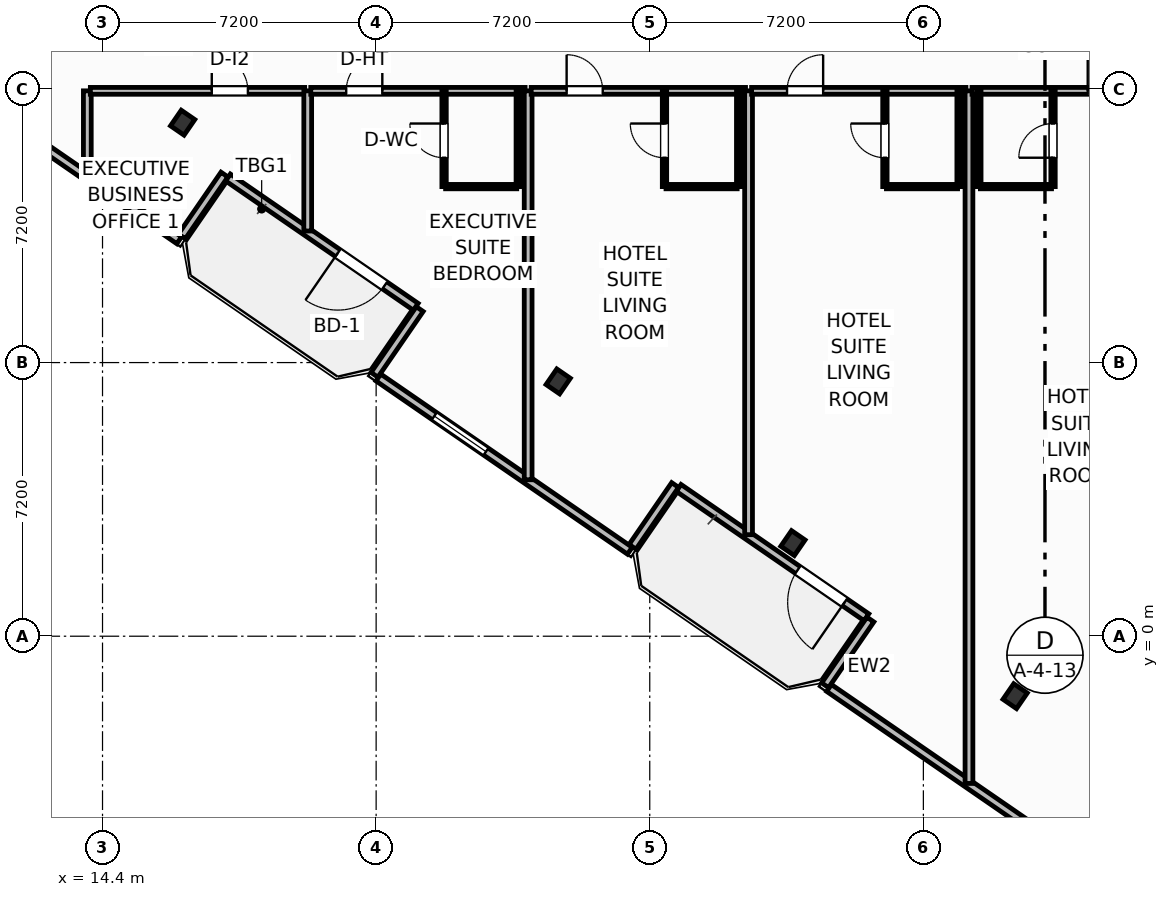
"""IFC4 building model, lengths in metres.
Left out: names, types, materials, properties, quantities, classifications, styles, units other than length and angle.
Written with IfcOpenShell. Run it as: python <this file> out.ifc"""

import sys

from ifc_helpers import new_model, si_unit, direction, frame, frame_2d, origin, origin_2d, place, context, subcontext, project, spatial, rectangle, i_section, extrude, element, fill, save


model = new_model("IFC4")
c1 = context("Model", 3, precision=1e-05, world=origin(), true_north=direction((0.0, 1.0)))
c2 = subcontext(c1, "Body", "Model", "MODEL_VIEW")
j1 = project(units=[si_unit("LENGTHUNIT", "METRE"), si_unit("PLANEANGLEUNIT", "RADIAN")], contexts=[c1])
p1 = place(None, origin())
s1 = spatial("IfcSite", under=j1, at=p1, CompositionType="ELEMENT")
p2 = place(p1, origin())
s2 = spatial("IfcBuilding", under=s1, at=p2, CompositionType="ELEMENT")
p3 = place(p2, frame((0.0, 0.0, 60.3)))
s3 = spatial("IfcBuildingStorey", under=s2, at=p3, CompositionType="ELEMENT", Elevation=60.3)
for number, where, z_axis, x_axis in (
    (1, (16.509, 13.512, 0.0), (0.0, 0.0, 1.0), (0.824, -0.567, 0.0)),
    (2, (26.391, 6.705, 0.0), (0.0, 0.0, 1.0), (0.824, -0.567, 0.0)),
    (3, (32.568, 2.45, 0.0), (0.0, 0.0, 1.0), (0.824, -0.567, 0.0)),
    (4, (38.415, -1.577, 0.0), (0.0, 0.0, 1.0), (0.824, -0.567, 0.0)),
):
    element("IfcColumn", number, at=place(p3, frame(where, z_axis=z_axis, x_axis=x_axis)), inside=s3, PredefinedType="COLUMN", context=c2, shape_type="SweptSolid", body=[
        extrude(i_section(OverallWidth=0.432, OverallDepth=0.498, WebThickness=0.056, FlangeThickness=0.089, FilletRadius=0.025, at=origin_2d()), origin(), (0.0, 0.0, 1.0), 3.7),
    ])
p4 = place(p3, frame((22.643, 8.667, 0.0), z_axis=(0.0, 0.0, 1.0), x_axis=(-0.823534636215, 0.567265989598, 0.0)))
e5 = element("IfcWall", 5, at=p4, inside=s3, PredefinedType="SOLIDWALL", context=c2, shape_type="SweptSolid", body=[
    extrude(rectangle(XDim=6.0, YDim=0.22, at=frame_2d((3.0, 0.0))), origin(), (0.0, 0.0, 1.0), 2.73),
])
p5 = place(p4, frame((0.992, 0.0, 0.0)))
e6 = element("IfcOpeningElement", 6, at=p5, cuts=e5, PredefinedType="OPENING", context=c2, shape_type="SweptSolid", body=[
    extrude(rectangle(XDim=1.5, YDim=2.25, at=frame_2d((0.75, 1.125))), frame((0.0, 0.12, 0.0), z_axis=(0.0, -1.0, 0.0), x_axis=(1.0, 0.0, 0.0)), (0.0, 0.0, 1.0), 0.24),
])
p6 = place(p3, frame((34.502, 0.499, 0.0), z_axis=(0.0, 0.0, 1.0), x_axis=(-0.823534636215, 0.567265989598, 0.0)))
e7 = element("IfcWall", 7, at=p6, inside=s3, PredefinedType="SOLIDWALL", context=c2, shape_type="SweptSolid", body=[
    extrude(rectangle(XDim=6.0, YDim=0.22, at=frame_2d((3.0, 0.0))), origin(), (0.0, 0.0, 1.0), 2.73),
])
p7 = place(p6, frame((0.696, 0.0, 0.0)))
e8 = element("IfcOpeningElement", 8, at=p7, cuts=e7, PredefinedType="OPENING", context=c2, shape_type="SweptSolid", body=[
    extrude(rectangle(XDim=1.5, YDim=2.25, at=frame_2d((0.75, 1.125))), frame((0.0, 0.12, 0.0), z_axis=(0.0, -1.0, 0.0), x_axis=(1.0, 0.0, 0.0)), (0.0, 0.0, 1.0), 0.24),
])
p8 = place(p3, frame((-2.728, 23.605, 0.0), z_axis=(0.0, 0.0, 1.0), x_axis=(0.823535075462, -0.567265351915, 0.0)))
e9 = element("IfcWall", 9, at=p8, inside=s3, PredefinedType="SOLIDWALL", context=c2, shape_type="SweptSolid", body=[
    extrude(rectangle(XDim=23.247, YDim=0.22, at=frame_2d((11.624, 0.0))), origin(), (0.0, 0.0, 1.0), 2.73),
])
p9 = place(p8, frame((15.55, 0.0, 0.8)))
e10 = element("IfcOpeningElement", 10, at=p9, cuts=e9, PredefinedType="OPENING", context=c2, shape_type="SweptSolid", body=[
    extrude(rectangle(XDim=1.65, YDim=1.65, at=frame_2d((0.825, 0.825))), frame((0.0, 0.12, 0.0), z_axis=(0.0, -1.0, 0.0), x_axis=(1.0, 0.0, 0.0)), (0.0, 0.0, 1.0), 0.24),
])
p10 = place(p3, frame((16.488, 10.521, 0.0), z_axis=(0.0, 0.0, 1.0), x_axis=(0.567131976434, 0.823626930902, 0.0)))
e11 = element("IfcWall", 11, at=p10, inside=s3, PredefinedType="SOLIDWALL", context=c2, shape_type="SweptSolid", body=[
    extrude(rectangle(XDim=1.975, YDim=0.22, at=frame_2d((0.988, 0.0))), origin(), (0.0, 0.0, 1.0), 2.73),
])
p11 = place(p3, frame((22.747, 8.607, 0.0), z_axis=(0.0, 0.0, 1.0), x_axis=(-0.567219383419, -0.823566737474, 0.0)))
e12 = element("IfcWall", 12, at=p11, inside=s3, PredefinedType="SOLIDWALL", context=c2, shape_type="SweptSolid", body=[
    extrude(rectangle(XDim=2.1, YDim=0.22, at=frame_2d((1.05, 0.0))), origin(), (0.0, 0.0, 1.0), 2.73),
])
p12 = place(p3, frame((21.659, 6.807, 0.0), z_axis=(0.0, 0.0, 1.0), x_axis=(0.823535360023, -0.567264938799, 0.0)))
e13 = element("IfcWall", 13, at=p12, inside=s3, PredefinedType="SOLIDWALL", context=c2, shape_type="SweptSolid", body=[
    extrude(rectangle(XDim=8.035, YDim=0.22, at=frame_2d((4.018, 0.0))), origin(), (0.0, 0.0, 1.0), 2.73),
])
p13 = place(p12, frame((1.788, 0.0, 0.8)))
e14 = element("IfcOpeningElement", 14, at=p13, cuts=e13, PredefinedType="OPENING", context=c2, shape_type="SweptSolid", body=[
    extrude(rectangle(XDim=1.65, YDim=1.65, at=frame_2d((0.825, 0.825))), frame((0.0, 0.12, 0.0), z_axis=(0.0, -1.0, 0.0), x_axis=(1.0, 0.0, 0.0)), (0.0, 0.0, 1.0), 0.24),
])
p14 = place(p3, frame((28.347, 2.352, 0.0), z_axis=(0.0, 0.0, 1.0), x_axis=(0.567215821234, 0.823569190865, 0.0)))
e15 = element("IfcWall", 15, at=p14, inside=s3, PredefinedType="SOLIDWALL", context=c2, shape_type="SweptSolid", body=[
    extrude(rectangle(XDim=1.975, YDim=0.22, at=frame_2d((0.988, 0.0))), origin(), (0.0, 0.0, 1.0), 2.73),
])
p15 = place(p3, frame((34.606, 0.439, 0.0), z_axis=(0.0, 0.0, 1.0), x_axis=(-0.567219383419, -0.823566737474, 0.0)))
e16 = element("IfcWall", 16, at=p15, inside=s3, PredefinedType="SOLIDWALL", context=c2, shape_type="SweptSolid", body=[
    extrude(rectangle(XDim=2.1, YDim=0.22, at=frame_2d((1.05, 0.0))), origin(), (0.0, 0.0, 1.0), 2.73),
])
p16 = place(p3, frame((33.518, -1.362, 0.0), z_axis=(0.0, 0.0, 1.0), x_axis=(0.82353935489, -0.567259139148, 0.0)))
e17 = element("IfcWall", 17, at=p16, inside=s3, PredefinedType="SOLIDWALL", context=c2, shape_type="SweptSolid", body=[
    extrude(rectangle(XDim=23.147, YDim=0.22, at=frame_2d((11.573, 0.0))), origin(), (0.0, 0.0, 1.0), 2.73),
])
p17 = place(p16, frame((10.749, 0.0, 0.8)))
e18 = element("IfcOpeningElement", 18, at=p17, cuts=e17, PredefinedType="OPENING", context=c2, shape_type="SweptSolid", body=[
    extrude(rectangle(XDim=1.65, YDim=1.65, at=frame_2d((0.825, 0.825))), frame((0.0, 0.12, 0.0), z_axis=(0.0, -1.0, 0.0), x_axis=(1.0, 0.0, 0.0)), (0.0, 0.0, 1.0), 0.24),
])
p18 = place(p3, frame((14.0, 12.107, 0.0), z_axis=(0.0, 0.0, 1.0), x_axis=(0.0, 1.0, 0.0)))
e19 = element("IfcWall", 19, at=p18, inside=s3, PredefinedType="PARTITIONING", context=c2, shape_type="SweptSolid", body=[
    extrude(rectangle(XDim=2.243, YDim=0.205, at=frame_2d((1.122, 0.0))), origin(), (0.0, 0.0, 1.0), 3.45),
])
p19 = place(p3, frame((14.08, 14.35, 0.0), z_axis=(0.0, 0.0, 1.0), x_axis=(1.0, 0.0, 0.0)))
e20 = element("IfcWall", 20, at=p19, inside=s3, PredefinedType="PARTITIONING", context=c2, shape_type="SweptSolid", body=[
    extrude(rectangle(XDim=5.64, YDim=0.18, at=frame_2d((2.82, 0.0))), origin(), (0.0, 0.0, 1.0), 3.45),
])
p20 = place(p19, frame((3.195, 0.0, 0.0)))
e21 = element("IfcOpeningElement", 21, at=p20, cuts=e20, PredefinedType="OPENING", context=c2, shape_type="SweptSolid", body=[
    extrude(rectangle(XDim=0.95, YDim=2.05, at=frame_2d((0.475, 1.025))), frame((0.0, 0.1, 0.0), z_axis=(0.0, -1.0, 0.0), x_axis=(1.0, 0.0, 0.0)), (0.0, 0.0, 1.0), 0.2),
])
p21 = place(p3, frame((19.8, 10.662, 0.0), z_axis=(0.0, 0.0, 1.0), x_axis=(0.0, 1.0, 0.0)))
e22 = element("IfcWall", 22, at=p21, inside=s3, PredefinedType="PARTITIONING", context=c2, shape_type="SweptSolid", body=[
    extrude(rectangle(XDim=3.688, YDim=0.205, at=frame_2d((1.844, 0.0))), origin(), (0.0, 0.0, 1.0), 3.45),
])
p22 = place(p3, frame((19.88, 14.35, 0.0), z_axis=(0.0, 0.0, 1.0), x_axis=(1.0, 0.0, 0.0)))
e23 = element("IfcWall", 23, at=p22, inside=s3, PredefinedType="PARTITIONING", context=c2, shape_type="SweptSolid", body=[
    extrude(rectangle(XDim=5.64, YDim=0.18, at=frame_2d((2.82, 0.0))), origin(), (0.0, 0.0, 1.0), 3.45),
])
p23 = place(p22, frame((0.933, 0.0, 0.0)))
e24 = element("IfcOpeningElement", 24, at=p23, cuts=e23, PredefinedType="OPENING", context=c2, shape_type="SweptSolid", body=[
    extrude(rectangle(XDim=0.95, YDim=2.15, at=frame_2d((0.475, 1.075))), frame((0.0, 0.1, 0.0), z_axis=(0.0, -1.0, 0.0), x_axis=(1.0, 0.0, 0.0)), (0.0, 0.0, 1.0), 0.2),
])
p24 = place(p3, frame((23.428, 11.83, 0.0), z_axis=(0.0, 0.0, 1.0), x_axis=(1.0, 0.0, 0.0)))
e25 = element("IfcWall", 25, at=p24, inside=s3, PredefinedType="PARTITIONING", context=c2, shape_type="SweptSolid", body=[
    extrude(rectangle(XDim=1.872, YDim=0.115, at=frame_2d((0.936, 0.0))), origin(), (0.0, 0.0, 1.0), 3.45),
])
p25 = place(p3, frame((23.388, 11.83, 0.0), z_axis=(0.0, 0.0, 1.0), x_axis=(0.0, 1.0, 0.0)))
e26 = element("IfcWall", 26, at=p25, inside=s3, PredefinedType="PARTITIONING", context=c2, shape_type="SweptSolid", body=[
    extrude(rectangle(XDim=2.52, YDim=0.115, at=frame_2d((1.26, 0.0))), origin(), (0.0, 0.0, 1.0), 3.45),
])
p26 = place(p25, frame((0.76, 0.0, 0.0)))
e27 = element("IfcOpeningElement", 27, at=p26, cuts=e26, PredefinedType="OPENING", context=c2, shape_type="SweptSolid", body=[
    extrude(rectangle(XDim=0.9, YDim=2.05, at=frame_2d((0.45, 1.025))), frame((0.0, 0.067, 0.0), z_axis=(0.0, -1.0, 0.0), x_axis=(1.0, 0.0, 0.0)), (0.0, 0.0, 1.0), 0.135),
])
p27 = place(p3, frame((25.34, 11.83, 0.0), z_axis=(0.0, 0.0, 1.0), x_axis=(0.0, 1.0, 0.0)))
e28 = element("IfcWall", 28, at=p27, inside=s3, PredefinedType="PARTITIONING", context=c2, shape_type="SweptSolid", body=[
    extrude(rectangle(XDim=2.52, YDim=0.115, at=frame_2d((1.26, 0.0))), origin(), (0.0, 0.0, 1.0), 2.58),
])
p28 = place(p3, frame((25.6, 4.117, 0.0), z_axis=(0.0, 0.0, 1.0), x_axis=(0.0, 1.0, 0.0)))
e29 = element("IfcWall", 29, at=p28, inside=s3, PredefinedType="PARTITIONING", context=c2, shape_type="SweptSolid", body=[
    extrude(rectangle(XDim=10.233, YDim=0.205, at=frame_2d((5.117, 0.0))), origin(), (0.0, 0.0, 1.0), 2.58),
])
p29 = place(p3, frame((25.68, 14.35, 0.0), z_axis=(0.0, 0.0, 1.0), x_axis=(1.0, 0.0, 0.0)))
e30 = element("IfcWall", 30, at=p29, inside=s3, PredefinedType="PARTITIONING", context=c2, shape_type="SweptSolid", body=[
    extrude(rectangle(XDim=5.64, YDim=0.18, at=frame_2d((2.82, 0.0))), origin(), (0.0, 0.0, 1.0), 3.45),
])
p30 = place(p29, frame((0.933, 0.0, 0.0)))
e31 = element("IfcOpeningElement", 31, at=p30, cuts=e30, PredefinedType="OPENING", context=c2, shape_type="SweptSolid", body=[
    extrude(rectangle(XDim=0.95, YDim=2.15, at=frame_2d((0.475, 1.075))), frame((0.0, 0.1, 0.0), z_axis=(0.0, -1.0, 0.0), x_axis=(1.0, 0.0, 0.0)), (0.0, 0.0, 1.0), 0.2),
])
p31 = place(p3, frame((29.228, 11.83, 0.0), z_axis=(0.0, 0.0, 1.0), x_axis=(1.0, 0.0, 0.0)))
e32 = element("IfcWall", 32, at=p31, inside=s3, PredefinedType="PARTITIONING", context=c2, shape_type="SweptSolid", body=[
    extrude(rectangle(XDim=1.872, YDim=0.115, at=frame_2d((0.936, 0.0))), origin(), (0.0, 0.0, 1.0), 3.45),
])
p32 = place(p3, frame((29.188, 11.83, 0.0), z_axis=(0.0, 0.0, 1.0), x_axis=(0.0, 1.0, 0.0)))
e33 = element("IfcWall", 33, at=p32, inside=s3, PredefinedType="PARTITIONING", context=c2, shape_type="SweptSolid", body=[
    extrude(rectangle(XDim=2.52, YDim=0.115, at=frame_2d((1.26, 0.0))), origin(), (0.0, 0.0, 1.0), 3.45),
])
p33 = place(p32, frame((0.76, 0.0, 0.0)))
e34 = element("IfcOpeningElement", 34, at=p33, cuts=e33, PredefinedType="OPENING", context=c2, shape_type="SweptSolid", body=[
    extrude(rectangle(XDim=0.9, YDim=2.05, at=frame_2d((0.45, 1.025))), frame((0.0, 0.067, 0.0), z_axis=(0.0, -1.0, 0.0), x_axis=(1.0, 0.0, 0.0)), (0.0, 0.0, 1.0), 0.135),
])
p34 = place(p3, frame((31.14, 11.83, 0.0), z_axis=(0.0, 0.0, 1.0), x_axis=(0.0, 1.0, 0.0)))
e35 = element("IfcWall", 35, at=p34, inside=s3, PredefinedType="PARTITIONING", context=c2, shape_type="SweptSolid", body=[
    extrude(rectangle(XDim=2.52, YDim=0.115, at=frame_2d((1.26, 0.0))), origin(), (0.0, 0.0, 1.0), 3.45),
])
p35 = place(p3, frame((31.4, 2.671, 0.0), z_axis=(0.0, 0.0, 1.0), x_axis=(0.0, 1.0, 0.0)))
e36 = element("IfcWall", 36, at=p35, inside=s3, PredefinedType="PARTITIONING", context=c2, shape_type="SweptSolid", body=[
    extrude(rectangle(XDim=11.679, YDim=0.205, at=frame_2d((5.839, 0.0))), origin(), (0.0, 0.0, 1.0), 3.45),
])
p36 = place(p3, frame((31.48, 14.35, 0.0), z_axis=(0.0, 0.0, 1.0), x_axis=(1.0, 0.0, 0.0)))
e37 = element("IfcWall", 37, at=p36, inside=s3, PredefinedType="PARTITIONING", context=c2, shape_type="SweptSolid", body=[
    extrude(rectangle(XDim=5.64, YDim=0.18, at=frame_2d((2.82, 0.0))), origin(), (0.0, 0.0, 1.0), 3.45),
])
p37 = place(p36, frame((0.933, 0.0, 0.0)))
e38 = element("IfcOpeningElement", 38, at=p37, cuts=e37, PredefinedType="OPENING", context=c2, shape_type="SweptSolid", body=[
    extrude(rectangle(XDim=0.95, YDim=2.15, at=frame_2d((0.475, 1.075))), frame((0.0, 0.1, 0.0), z_axis=(0.0, -1.0, 0.0), x_axis=(1.0, 0.0, 0.0)), (0.0, 0.0, 1.0), 0.2),
])
p38 = place(p3, frame((35.028, 11.83, 0.0), z_axis=(0.0, 0.0, 1.0), x_axis=(1.0, 0.0, 0.0)))
e39 = element("IfcWall", 39, at=p38, inside=s3, PredefinedType="PARTITIONING", context=c2, shape_type="SweptSolid", body=[
    extrude(rectangle(XDim=1.872, YDim=0.115, at=frame_2d((0.936, 0.0))), origin(), (0.0, 0.0, 1.0), 3.45),
])
p39 = place(p3, frame((34.988, 11.83, 0.0), z_axis=(0.0, 0.0, 1.0), x_axis=(0.0, 1.0, 0.0)))
e40 = element("IfcWall", 40, at=p39, inside=s3, PredefinedType="PARTITIONING", context=c2, shape_type="SweptSolid", body=[
    extrude(rectangle(XDim=2.52, YDim=0.115, at=frame_2d((1.26, 0.0))), origin(), (0.0, 0.0, 1.0), 3.45),
])
p40 = place(p39, frame((0.76, 0.0, 0.0)))
e41 = element("IfcOpeningElement", 41, at=p40, cuts=e40, PredefinedType="OPENING", context=c2, shape_type="SweptSolid", body=[
    extrude(rectangle(XDim=0.9, YDim=2.05, at=frame_2d((0.45, 1.025))), frame((0.0, 0.067, 0.0), z_axis=(0.0, -1.0, 0.0), x_axis=(1.0, 0.0, 0.0)), (0.0, 0.0, 1.0), 0.135),
])
p41 = place(p3, frame((36.94, 11.83, 0.0), z_axis=(0.0, 0.0, 1.0), x_axis=(0.0, 1.0, 0.0)))
e42 = element("IfcWall", 42, at=p41, inside=s3, PredefinedType="PARTITIONING", context=c2, shape_type="SweptSolid", body=[
    extrude(rectangle(XDim=2.52, YDim=0.115, at=frame_2d((1.26, 0.0))), origin(), (0.0, 0.0, 1.0), 3.45),
])
p42 = place(p3, frame((37.2, -3.874, 0.0), z_axis=(0.0, 0.0, 1.0), x_axis=(0.0, 1.0, 0.0)))
e43 = element("IfcWall", 43, at=p42, inside=s3, PredefinedType="PARTITIONING", context=c2, shape_type="SweptSolid", body=[
    extrude(rectangle(XDim=18.224, YDim=0.205, at=frame_2d((9.112, 0.0))), origin(), (0.0, 0.0, 1.0), 3.45),
])
p43 = place(p3, frame((37.28, 14.35, 0.0), z_axis=(0.0, 0.0, 1.0), x_axis=(1.0, 0.0, 0.0)))
e44 = element("IfcWall", 44, at=p43, inside=s3, PredefinedType="PARTITIONING", context=c2, shape_type="SweptSolid", body=[
    extrude(rectangle(XDim=5.64, YDim=0.18, at=frame_2d((2.82, 0.0))), origin(), (0.0, 0.0, 1.0), 3.45),
])
p44 = place(p43, frame((3.045, 0.0, 0.0)))
e45 = element("IfcOpeningElement", 45, at=p44, cuts=e44, PredefinedType="OPENING", context=c2, shape_type="SweptSolid", body=[
    extrude(rectangle(XDim=0.95, YDim=2.15, at=frame_2d((0.475, 1.075))), frame((0.0, 0.1, 0.0), z_axis=(0.0, -1.0, 0.0), x_axis=(1.0, 0.0, 0.0)), (0.0, 0.0, 1.0), 0.2),
])
p45 = place(p3, frame((37.5, 11.83, 0.0), z_axis=(0.0, 0.0, 1.0), x_axis=(1.0, 0.0, 0.0)))
e46 = element("IfcWall", 46, at=p45, inside=s3, PredefinedType="PARTITIONING", context=c2, shape_type="SweptSolid", body=[
    extrude(rectangle(XDim=1.872, YDim=0.115, at=frame_2d((0.936, 0.0))), origin(), (0.0, 0.0, 1.0), 3.45),
])
p46 = place(p3, frame((39.412, 11.83, 0.0), z_axis=(0.0, 0.0, 1.0), x_axis=(0.0, 1.0, 0.0)))
e47 = element("IfcWall", 47, at=p46, inside=s3, PredefinedType="PARTITIONING", context=c2, shape_type="SweptSolid", body=[
    extrude(rectangle(XDim=2.52, YDim=0.115, at=frame_2d((1.26, 0.0))), origin(), (0.0, 0.0, 1.0), 3.45),
])
p47 = place(p46, frame((0.76, 0.0, 0.0)))
e48 = element("IfcOpeningElement", 48, at=p47, cuts=e47, PredefinedType="OPENING", context=c2, shape_type="SweptSolid", body=[
    extrude(rectangle(XDim=0.9, YDim=2.05, at=frame_2d((0.45, 1.025))), frame((0.0, 0.067, 0.0), z_axis=(0.0, -1.0, 0.0), x_axis=(1.0, 0.0, 0.0)), (0.0, 0.0, 1.0), 0.135),
])
p48 = place(p3, frame((37.46, 11.83, 0.0), z_axis=(0.0, 0.0, 1.0), x_axis=(0.0, 1.0, 0.0)))
e49 = element("IfcWall", 49, at=p48, inside=s3, PredefinedType="PARTITIONING", context=c2, shape_type="SweptSolid", body=[
    extrude(rectangle(XDim=2.52, YDim=0.115, at=frame_2d((1.26, 0.0))), origin(), (0.0, 0.0, 1.0), 3.45),
])
p49 = place(p5, origin())
e50 = element("IfcDoor", 50, at=p49, inside=s3, OperationType="SINGLE_SWING_RIGHT", PredefinedType="DOOR", context=c2, shape_type="SweptSolid", body=[
    extrude(rectangle(XDim=1.5, YDim=2.25, at=frame_2d((0.75, 1.125))), frame((0.0, 0.025, 0.0), z_axis=(0.0, -1.0, 0.0), x_axis=(1.0, 0.0, 0.0)), (0.0, 0.0, 1.0), 0.05),
])
fill(e6, e50)
p50 = place(p7, origin())
e51 = element("IfcDoor", 51, at=p50, inside=s3, OperationType="SINGLE_SWING_LEFT", PredefinedType="DOOR", context=c2, shape_type="SweptSolid", body=[
    extrude(rectangle(XDim=1.5, YDim=2.25, at=frame_2d((0.75, 1.125))), frame((0.0, 0.025, 0.0), z_axis=(0.0, -1.0, 0.0), x_axis=(1.0, 0.0, 0.0)), (0.0, 0.0, 1.0), 0.05),
])
fill(e8, e51)
p51 = place(p13, origin())
e52 = element("IfcWindow", 52, at=p51, inside=s3, PartitioningType="SINGLE_PANEL", PredefinedType="WINDOW", context=c2, shape_type="SweptSolid", body=[
    extrude(rectangle(XDim=1.65, YDim=1.65, at=frame_2d((0.825, 0.825))), frame((0.0, 0.03, 0.0), z_axis=(0.0, -1.0, 0.0), x_axis=(1.0, 0.0, 0.0)), (0.0, 0.0, 1.0), 0.06),
])
fill(e14, e52)
p52 = place(p20, origin())
e53 = element("IfcDoor", 53, at=p52, inside=s3, OperationType="SINGLE_SWING_LEFT", PredefinedType="DOOR", context=c2, shape_type="SweptSolid", body=[
    extrude(rectangle(XDim=0.95, YDim=2.05, at=frame_2d((0.475, 1.025))), frame((0.0, 0.025, 0.0), z_axis=(0.0, -1.0, 0.0), x_axis=(1.0, 0.0, 0.0)), (0.0, 0.0, 1.0), 0.05),
])
fill(e21, e53)
p53 = place(p23, origin())
e54 = element("IfcDoor", 54, at=p53, inside=s3, OperationType="SINGLE_SWING_RIGHT", PredefinedType="DOOR", context=c2, shape_type="SweptSolid", body=[
    extrude(rectangle(XDim=0.95, YDim=2.15, at=frame_2d((0.475, 1.075))), frame((0.0, 0.025, 0.0), z_axis=(0.0, -1.0, 0.0), x_axis=(1.0, 0.0, 0.0)), (0.0, 0.0, 1.0), 0.05),
])
fill(e24, e54)
p54 = place(p26, origin())
e55 = element("IfcDoor", 55, at=p54, inside=s3, OperationType="SINGLE_SWING_RIGHT", PredefinedType="DOOR", context=c2, shape_type="SweptSolid", body=[
    extrude(rectangle(XDim=0.9, YDim=2.05, at=frame_2d((0.45, 1.025))), frame((0.0, 0.025, 0.0), z_axis=(0.0, -1.0, 0.0), x_axis=(1.0, 0.0, 0.0)), (0.0, 0.0, 1.0), 0.05),
])
fill(e27, e55)
p55 = place(p30, origin())
e56 = element("IfcDoor", 56, at=p55, inside=s3, OperationType="SINGLE_SWING_LEFT", PredefinedType="DOOR", context=c2, shape_type="SweptSolid", body=[
    extrude(rectangle(XDim=0.95, YDim=2.15, at=frame_2d((0.475, 1.075))), frame((0.0, 0.025, 0.0), z_axis=(0.0, -1.0, 0.0), x_axis=(1.0, 0.0, 0.0)), (0.0, 0.0, 1.0), 0.05),
])
fill(e31, e56)
p56 = place(p33, origin())
e57 = element("IfcDoor", 57, at=p56, inside=s3, OperationType="SINGLE_SWING_RIGHT", PredefinedType="DOOR", context=c2, shape_type="SweptSolid", body=[
    extrude(rectangle(XDim=0.9, YDim=2.05, at=frame_2d((0.45, 1.025))), frame((0.0, 0.025, 0.0), z_axis=(0.0, -1.0, 0.0), x_axis=(1.0, 0.0, 0.0)), (0.0, 0.0, 1.0), 0.05),
])
fill(e34, e57)
p57 = place(p37, origin())
e58 = element("IfcDoor", 58, at=p57, inside=s3, OperationType="SINGLE_SWING_RIGHT", PredefinedType="DOOR", context=c2, shape_type="SweptSolid", body=[
    extrude(rectangle(XDim=0.95, YDim=2.15, at=frame_2d((0.475, 1.075))), frame((0.0, 0.025, 0.0), z_axis=(0.0, -1.0, 0.0), x_axis=(1.0, 0.0, 0.0)), (0.0, 0.0, 1.0), 0.05),
])
fill(e38, e58)
p58 = place(p40, origin())
e59 = element("IfcDoor", 59, at=p58, inside=s3, OperationType="SINGLE_SWING_RIGHT", PredefinedType="DOOR", context=c2, shape_type="SweptSolid", body=[
    extrude(rectangle(XDim=0.9, YDim=2.05, at=frame_2d((0.45, 1.025))), frame((0.0, 0.025, 0.0), z_axis=(0.0, -1.0, 0.0), x_axis=(1.0, 0.0, 0.0)), (0.0, 0.0, 1.0), 0.05),
])
fill(e41, e59)
p59 = place(p44, origin())
e60 = element("IfcDoor", 60, at=p59, inside=s3, OperationType="SINGLE_SWING_LEFT", PredefinedType="DOOR", context=c2, shape_type="SweptSolid", body=[
    extrude(rectangle(XDim=0.95, YDim=2.15, at=frame_2d((0.475, 1.075))), frame((0.0, 0.025, 0.0), z_axis=(0.0, -1.0, 0.0), x_axis=(1.0, 0.0, 0.0)), (0.0, 0.0, 1.0), 0.05),
])
fill(e45, e60)
p60 = place(p47, origin())
e61 = element("IfcDoor", 61, at=p60, inside=s3, OperationType="SINGLE_SWING_LEFT", PredefinedType="DOOR", context=c2, shape_type="SweptSolid", body=[
    extrude(rectangle(XDim=0.9, YDim=2.05, at=frame_2d((0.45, 1.025))), frame((0.0, 0.025, 0.0), z_axis=(0.0, -1.0, 0.0), x_axis=(1.0, 0.0, 0.0)), (0.0, 0.0, 1.0), 0.05),
])
fill(e48, e61)
save(model, sys.argv[1])
